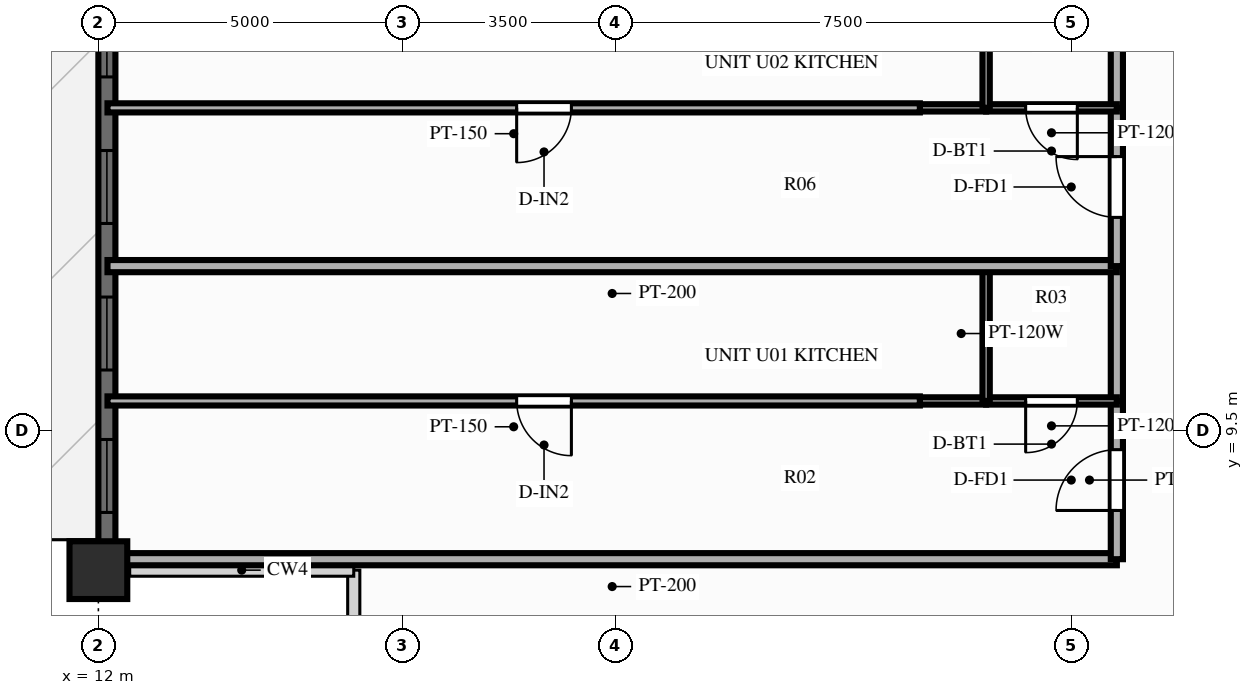
"""IFC4 building model, lengths in metres.
Left out: names, types, materials, properties, quantities, classifications, styles, units other than length and angle.
Written with IfcOpenShell. Run it as: python <this file> out.ifc"""

import sys

from ifc_helpers import new_model, si_unit, direction, frame, frame_2d, origin, origin_2d, place, context, subcontext, project, spatial, rectangle, extrude, source, transform, mapped, element, fill, save


model = new_model("IFC4")
c1 = context("Model", 3, precision=1e-05, world=origin(), true_north=direction((0.0, 1.0)))
c2 = subcontext(c1, "Body", "Model", "MODEL_VIEW")
j1 = project(units=[si_unit("LENGTHUNIT", "METRE"), si_unit("PLANEANGLEUNIT", "RADIAN")], contexts=[c1])
p1 = place(None, origin())
s1 = spatial("IfcSite", under=j1, at=p1, CompositionType="ELEMENT")
p2 = place(p1, origin())
s2 = spatial("IfcBuilding", under=s1, at=p2, CompositionType="ELEMENT")
p3 = place(p2, frame((0.0, 0.0, 126.75)))
s3 = spatial("IfcBuildingStorey", under=s2, at=p3, CompositionType="ELEMENT", Elevation=126.75)
m1 = source(origin(), c2, "Body", "SweptSolid", [
    extrude(rectangle(XDim=0.95, YDim=0.95, at=origin_2d()), origin(), (0.0, 0.0, 1.0), 3.0),
])
p4 = place(p3, frame((12.0, 7.2, 0.0), z_axis=(0.0, 0.0, 1.0), x_axis=(1.0, 0.0, 0.0)))
e1 = element("IfcColumn", 1, at=p4, inside=s3, PredefinedType="COLUMN", context=c2, shape_type="MappedRepresentation", body=[
    mapped(m1, transform((0.0, 0.0, 0.0), scale=1.0)),
])
p5 = place(p3, frame((12.14, 7.2, 0.0), z_axis=(0.0, 0.0, 1.0), x_axis=(0.0, 1.0, 0.0)))
e2 = element("IfcWall", 2, at=p5, inside=s3, PredefinedType="SOLIDWALL", context=c2, shape_type="SweptSolid", body=[
    extrude(rectangle(XDim=39.6, YDim=0.28, at=frame_2d((19.8, 0.0))), origin(), (0.0, 0.0, 1.0), 2.28),
])
p6 = place(p5, frame((0.949, 0.0, 0.25)))
e3 = element("IfcOpeningElement", 3, at=p6, cuts=e2, PredefinedType="OPENING", context=c2, shape_type="SweptSolid", body=[
    extrude(rectangle(XDim=1.2, YDim=1.5, at=frame_2d((0.6, 0.75))), frame((0.0, 0.152, 0.0), z_axis=(0.0, -1.0, 0.0), x_axis=(1.0, 0.0, 0.0)), (0.0, 0.0, 1.0), 0.304),
])
p7 = place(p5, frame((3.292, 0.0, 0.25)))
e4 = element("IfcOpeningElement", 4, at=p7, cuts=e2, PredefinedType="OPENING", context=c2, shape_type="SweptSolid", body=[
    extrude(rectangle(XDim=1.2, YDim=1.5, at=frame_2d((0.6, 0.75))), frame((0.0, 0.152, 0.0), z_axis=(0.0, -1.0, 0.0), x_axis=(1.0, 0.0, 0.0)), (0.0, 0.0, 1.0), 0.304),
])
p8 = place(p5, frame((5.702, 0.0, 0.25)))
e5 = element("IfcOpeningElement", 5, at=p8, cuts=e2, PredefinedType="OPENING", context=c2, shape_type="SweptSolid", body=[
    extrude(rectangle(XDim=1.2, YDim=1.5, at=frame_2d((0.6, 0.75))), frame((0.0, 0.152, 0.0), z_axis=(0.0, -1.0, 0.0), x_axis=(1.0, 0.0, 0.0)), (0.0, 0.0, 1.0), 0.304),
])
p9 = place(p5, frame((8.112, 0.0, 0.25)))
e6 = element("IfcOpeningElement", 6, at=p9, cuts=e2, PredefinedType="OPENING", context=c2, shape_type="SweptSolid", body=[
    extrude(rectangle(XDim=1.2, YDim=1.5, at=frame_2d((0.6, 0.75))), frame((0.0, 0.152, 0.0), z_axis=(0.0, -1.0, 0.0), x_axis=(1.0, 0.0, 0.0)), (0.0, 0.0, 1.0), 0.304),
])
p10 = place(p5, frame((12.521, 0.0, 0.25)))
e7 = element("IfcOpeningElement", 7, at=p10, cuts=e2, PredefinedType="OPENING", context=c2, shape_type="SweptSolid", body=[
    extrude(rectangle(XDim=1.2, YDim=1.5, at=frame_2d((0.6, 0.75))), frame((0.0, 0.152, 0.0), z_axis=(0.0, -1.0, 0.0), x_axis=(1.0, 0.0, 0.0)), (0.0, 0.0, 1.0), 0.304),
])
p11 = place(p5, frame((14.745, 0.0, 0.25)))
e8 = element("IfcOpeningElement", 8, at=p11, cuts=e2, PredefinedType="OPENING", context=c2, shape_type="SweptSolid", body=[
    extrude(rectangle(XDim=1.2, YDim=1.5, at=frame_2d((0.6, 0.75))), frame((0.0, 0.152, 0.0), z_axis=(0.0, -1.0, 0.0), x_axis=(1.0, 0.0, 0.0)), (0.0, 0.0, 1.0), 0.304),
])
p12 = place(p5, frame((16.97, 0.0, 0.25)))
e9 = element("IfcOpeningElement", 9, at=p12, cuts=e2, PredefinedType="OPENING", context=c2, shape_type="SweptSolid", body=[
    extrude(rectangle(XDim=1.2, YDim=1.5, at=frame_2d((0.6, 0.75))), frame((0.0, 0.152, 0.0), z_axis=(0.0, -1.0, 0.0), x_axis=(1.0, 0.0, 0.0)), (0.0, 0.0, 1.0), 0.304),
])
p13 = place(p5, frame((19.2, 0.0, 0.25)))
e10 = element("IfcOpeningElement", 10, at=p13, cuts=e2, PredefinedType="OPENING", context=c2, shape_type="SweptSolid", body=[
    extrude(rectangle(XDim=1.2, YDim=1.5, at=frame_2d((0.6, 0.75))), frame((0.0, 0.152, 0.0), z_axis=(0.0, -1.0, 0.0), x_axis=(1.0, 0.0, 0.0)), (0.0, 0.0, 1.0), 0.304),
])
p14 = place(p5, frame((21.578, 0.0, 0.25)))
e11 = element("IfcOpeningElement", 11, at=p14, cuts=e2, PredefinedType="OPENING", context=c2, shape_type="SweptSolid", body=[
    extrude(rectangle(XDim=1.2, YDim=1.5, at=frame_2d((0.6, 0.75))), frame((0.0, 0.152, 0.0), z_axis=(0.0, -1.0, 0.0), x_axis=(1.0, 0.0, 0.0)), (0.0, 0.0, 1.0), 0.304),
])
p15 = place(p5, frame((24.713, 0.0, 0.0)))
e12 = element("IfcOpeningElement", 12, at=p15, cuts=e2, PredefinedType="OPENING", context=c2, shape_type="SweptSolid", body=[
    extrude(rectangle(XDim=1.6, YDim=2.15, at=frame_2d((0.8, 1.075))), frame((0.0, 0.152, 0.0), z_axis=(0.0, -1.0, 0.0), x_axis=(1.0, 0.0, 0.0)), (0.0, 0.0, 1.0), 0.304),
])
p16 = place(p5, frame((29.305, 0.0, 0.25)))
e13 = element("IfcOpeningElement", 13, at=p16, cuts=e2, PredefinedType="OPENING", context=c2, shape_type="SweptSolid", body=[
    extrude(rectangle(XDim=0.7, YDim=1.5, at=frame_2d((0.35, 0.75))), frame((0.0, 0.152, 0.0), z_axis=(0.0, -1.0, 0.0), x_axis=(1.0, 0.0, 0.0)), (0.0, 0.0, 1.0), 0.304),
])
p17 = place(p5, frame((30.848, 0.0, 0.25)))
e14 = element("IfcOpeningElement", 14, at=p17, cuts=e2, PredefinedType="OPENING", context=c2, shape_type="SweptSolid", body=[
    extrude(rectangle(XDim=1.2, YDim=1.5, at=frame_2d((0.6, 0.75))), frame((0.0, 0.152, 0.0), z_axis=(0.0, -1.0, 0.0), x_axis=(1.0, 0.0, 0.0)), (0.0, 0.0, 1.0), 0.304),
])
p18 = place(p5, frame((34.183, 0.0, 0.25)))
e15 = element("IfcOpeningElement", 15, at=p18, cuts=e2, PredefinedType="OPENING", context=c2, shape_type="SweptSolid", body=[
    extrude(rectangle(XDim=1.2, YDim=1.5, at=frame_2d((0.6, 0.75))), frame((0.0, 0.152, 0.0), z_axis=(0.0, -1.0, 0.0), x_axis=(1.0, 0.0, 0.0)), (0.0, 0.0, 1.0), 0.304),
])
p19 = place(p5, frame((37.452, 0.0, 0.25)))
e16 = element("IfcOpeningElement", 16, at=p19, cuts=e2, PredefinedType="OPENING", context=c2, shape_type="SweptSolid", body=[
    extrude(rectangle(XDim=1.2, YDim=1.5, at=frame_2d((0.6, 0.75))), frame((0.0, 0.152, 0.0), z_axis=(0.0, -1.0, 0.0), x_axis=(1.0, 0.0, 0.0)), (0.0, 0.0, 1.0), 0.304),
])
p20 = place(p3, frame((28.75, 7.38, 0.0), z_axis=(0.0, 0.0, 1.0), x_axis=(-1.0, 0.0, 0.0)))
e17 = element("IfcWall", 17, at=p20, inside=s3, PredefinedType="PARTITIONING", context=c2, shape_type="SweptSolid", body=[
    extrude(rectangle(XDim=16.6, YDim=0.2, at=frame_2d((8.3, 0.0))), origin(), (0.0, 0.0, 1.0), 2.79),
])
p21 = place(p3, frame((28.75, 7.38, 0.0), z_axis=(0.0, 0.0, 1.0), x_axis=(0.0, 1.0, 0.0)))
e18 = element("IfcWall", 18, at=p21, inside=s3, PredefinedType="PARTITIONING", context=c2, shape_type="SweptSolid", body=[
    extrude(rectangle(XDim=2.603, YDim=0.2, at=frame_2d((1.302, 0.0))), origin(), (0.0, 0.0, 1.0), 2.79),
])
p22 = place(p21, frame((0.802, 0.0, 0.0)))
e19 = element("IfcOpeningElement", 19, at=p22, cuts=e18, PredefinedType="OPENING", context=c2, shape_type="SweptSolid", body=[
    extrude(rectangle(XDim=1.0, YDim=2.15, at=frame_2d((0.5, 1.075))), frame((0.0, 0.112, 0.0), z_axis=(0.0, -1.0, 0.0), x_axis=(1.0, 0.0, 0.0)), (0.0, 0.0, 1.0), 0.224),
])
p23 = place(p3, frame((28.75, 9.983, 0.0), z_axis=(0.0, 0.0, 1.0), x_axis=(0.0, 1.0, 0.0)))
e20 = element("IfcWall", 20, at=p23, inside=s3, PredefinedType="PARTITIONING", context=c2, shape_type="SweptSolid", body=[
    extrude(rectangle(XDim=2.218, YDim=0.2, at=frame_2d((1.109, 0.0))), origin(), (0.0, 0.0, 1.0), 2.79),
])
p24 = place(p3, frame((28.75, 9.983, 0.0), z_axis=(0.0, 0.0, 1.0), x_axis=(-1.0, 0.0, 0.0)))
e21 = element("IfcWall", 21, at=p24, inside=s3, PredefinedType="PARTITIONING", context=c2, shape_type="SweptSolid", body=[
    extrude(rectangle(XDim=2.15, YDim=0.12, at=frame_2d((1.075, 0.0))), origin(), (0.0, 0.0, 1.0), 2.79),
])
p25 = place(p24, frame((0.65, 0.0, 0.0)))
e22 = element("IfcOpeningElement", 22, at=p25, cuts=e21, PredefinedType="OPENING", context=c2, shape_type="SweptSolid", body=[
    extrude(rectangle(XDim=0.85, YDim=2.05, at=frame_2d((0.425, 1.025))), frame((0.0, 0.072, 0.0), z_axis=(0.0, -1.0, 0.0), x_axis=(1.0, 0.0, 0.0)), (0.0, 0.0, 1.0), 0.144),
])
p26 = place(p3, frame((26.6, 9.983, 0.0), z_axis=(0.0, 0.0, 1.0), x_axis=(-1.0, 0.0, 0.0)))
e23 = element("IfcWall", 23, at=p26, inside=s3, PredefinedType="PARTITIONING", context=c2, shape_type="SweptSolid", body=[
    extrude(rectangle(XDim=1.09, YDim=0.12, at=frame_2d((0.545, 0.0))), origin(), (0.0, 0.0, 1.0), 2.79),
])
p27 = place(p3, frame((26.6, 9.983, 0.0), z_axis=(0.0, 0.0, 1.0), x_axis=(0.0, 1.0, 0.0)))
e24 = element("IfcWall", 24, at=p27, inside=s3, PredefinedType="PARTITIONING", context=c2, shape_type="SweptSolid", body=[
    extrude(rectangle(XDim=2.218, YDim=0.12, at=frame_2d((1.109, 0.0))), origin(), (0.0, 0.0, 1.0), 2.79),
])
p28 = place(p3, frame((25.51, 9.983, 0.0), z_axis=(0.0, 0.0, 1.0), x_axis=(-1.0, 0.0, 0.0)))
e25 = element("IfcWall", 25, at=p28, inside=s3, PredefinedType="PARTITIONING", context=c2, shape_type="SweptSolid", body=[
    extrude(rectangle(XDim=13.36, YDim=0.15, at=frame_2d((6.68, 0.0))), origin(), (0.0, 0.0, 1.0), 2.79),
])
p29 = place(p28, frame((5.731, 0.0, 0.0)))
e26 = element("IfcOpeningElement", 26, at=p29, cuts=e25, PredefinedType="OPENING", context=c2, shape_type="SweptSolid", body=[
    extrude(rectangle(XDim=0.9, YDim=2.1, at=frame_2d((0.45, 1.05))), frame((0.0, 0.087, 0.0), z_axis=(0.0, -1.0, 0.0), x_axis=(1.0, 0.0, 0.0)), (0.0, 0.0, 1.0), 0.174),
])
p30 = place(p3, frame((28.75, 12.2, 0.0), z_axis=(0.0, 0.0, 1.0), x_axis=(-1.0, 0.0, 0.0)))
e27 = element("IfcWall", 27, at=p30, inside=s3, PredefinedType="PARTITIONING", context=c2, shape_type="SweptSolid", body=[
    extrude(rectangle(XDim=16.6, YDim=0.2, at=frame_2d((8.3, 0.0))), origin(), (0.0, 0.0, 1.0), 2.79),
])
p31 = place(p3, frame((28.75, 12.2, 0.0), z_axis=(0.0, 0.0, 1.0), x_axis=(0.0, 1.0, 0.0)))
e28 = element("IfcWall", 28, at=p31, inside=s3, PredefinedType="PARTITIONING", context=c2, shape_type="SweptSolid", body=[
    extrude(rectangle(XDim=2.603, YDim=0.2, at=frame_2d((1.302, 0.0))), origin(), (0.0, 0.0, 1.0), 2.79),
])
p32 = place(p31, frame((0.802, 0.0, 0.0)))
e29 = element("IfcOpeningElement", 29, at=p32, cuts=e28, PredefinedType="OPENING", context=c2, shape_type="SweptSolid", body=[
    extrude(rectangle(XDim=1.0, YDim=2.15, at=frame_2d((0.5, 1.075))), frame((0.0, 0.112, 0.0), z_axis=(0.0, -1.0, 0.0), x_axis=(1.0, 0.0, 0.0)), (0.0, 0.0, 1.0), 0.224),
])
p33 = place(p3, frame((28.75, 14.803, 0.0), z_axis=(0.0, 0.0, 1.0), x_axis=(0.0, 1.0, 0.0)))
e30 = element("IfcWall", 30, at=p33, inside=s3, PredefinedType="PARTITIONING", context=c2, shape_type="SweptSolid", body=[
    extrude(rectangle(XDim=2.217, YDim=0.2, at=frame_2d((1.109, 0.0))), origin(), (0.0, 0.0, 1.0), 2.79),
])
p34 = place(p3, frame((28.75, 14.803, 0.0), z_axis=(0.0, 0.0, 1.0), x_axis=(-1.0, 0.0, 0.0)))
e31 = element("IfcWall", 31, at=p34, inside=s3, PredefinedType="PARTITIONING", context=c2, shape_type="SweptSolid", body=[
    extrude(rectangle(XDim=2.15, YDim=0.12, at=frame_2d((1.075, 0.0))), origin(), (0.0, 0.0, 1.0), 2.79),
])
p35 = place(p34, frame((0.65, 0.0, 0.0)))
e32 = element("IfcOpeningElement", 32, at=p35, cuts=e31, PredefinedType="OPENING", context=c2, shape_type="SweptSolid", body=[
    extrude(rectangle(XDim=0.85, YDim=2.05, at=frame_2d((0.425, 1.025))), frame((0.0, 0.072, 0.0), z_axis=(0.0, -1.0, 0.0), x_axis=(1.0, 0.0, 0.0)), (0.0, 0.0, 1.0), 0.144),
])
p36 = place(p3, frame((26.6, 14.803, 0.0), z_axis=(0.0, 0.0, 1.0), x_axis=(-1.0, 0.0, 0.0)))
e33 = element("IfcWall", 33, at=p36, inside=s3, PredefinedType="PARTITIONING", context=c2, shape_type="SweptSolid", body=[
    extrude(rectangle(XDim=1.09, YDim=0.12, at=frame_2d((0.545, 0.0))), origin(), (0.0, 0.0, 1.0), 2.79),
])
p37 = place(p3, frame((26.6, 14.803, 0.0), z_axis=(0.0, 0.0, 1.0), x_axis=(0.0, 1.0, 0.0)))
e34 = element("IfcWall", 34, at=p37, inside=s3, PredefinedType="PARTITIONING", context=c2, shape_type="SweptSolid", body=[
    extrude(rectangle(XDim=2.217, YDim=0.12, at=frame_2d((1.109, 0.0))), origin(), (0.0, 0.0, 1.0), 2.79),
])
p38 = place(p3, frame((25.51, 14.803, 0.0), z_axis=(0.0, 0.0, 1.0), x_axis=(-1.0, 0.0, 0.0)))
e35 = element("IfcWall", 35, at=p38, inside=s3, PredefinedType="PARTITIONING", context=c2, shape_type="SweptSolid", body=[
    extrude(rectangle(XDim=13.36, YDim=0.15, at=frame_2d((6.68, 0.0))), origin(), (0.0, 0.0, 1.0), 2.79),
])
p39 = place(p38, frame((5.731, 0.0, 0.0)))
e36 = element("IfcOpeningElement", 36, at=p39, cuts=e35, PredefinedType="OPENING", context=c2, shape_type="SweptSolid", body=[
    extrude(rectangle(XDim=0.9, YDim=2.1, at=frame_2d((0.45, 1.05))), frame((0.0, 0.087, 0.0), z_axis=(0.0, -1.0, 0.0), x_axis=(1.0, 0.0, 0.0)), (0.0, 0.0, 1.0), 0.174),
])
m2 = source(origin(), c2, "Body", "SweptSolid", [
    extrude(rectangle(XDim=1.2, YDim=1.5, at=frame_2d((0.6, 0.75))), frame((0.0, 0.03, 0.0), z_axis=(0.0, -1.0, 0.0), x_axis=(1.0, 0.0, 0.0)), (0.0, 0.0, 1.0), 0.06),
])
p40 = place(p6, origin())
e37 = element("IfcWindow", 37, at=p40, inside=s3, PartitioningType="SINGLE_PANEL", PredefinedType="WINDOW", context=c2, shape_type="MappedRepresentation", body=[
    mapped(m2, transform((0.0, 0.0, 0.0), scale=1.0)),
])
fill(e3, e37)
p41 = place(p7, origin())
e38 = element("IfcWindow", 38, at=p41, inside=s3, PartitioningType="SINGLE_PANEL", PredefinedType="WINDOW", context=c2, shape_type="MappedRepresentation", body=[
    mapped(m2, transform((0.0, 0.0, 0.0), scale=1.0)),
])
fill(e4, e38)
p42 = place(p8, origin())
e39 = element("IfcWindow", 39, at=p42, inside=s3, PartitioningType="SINGLE_PANEL", PredefinedType="WINDOW", context=c2, shape_type="MappedRepresentation", body=[
    mapped(m2, transform((0.0, 0.0, 0.0), scale=1.0)),
])
fill(e5, e39)
p43 = place(p9, origin())
e40 = element("IfcWindow", 40, at=p43, inside=s3, PartitioningType="SINGLE_PANEL", PredefinedType="WINDOW", context=c2, shape_type="MappedRepresentation", body=[
    mapped(m2, transform((0.0, 0.0, 0.0), scale=1.0)),
])
fill(e6, e40)
m3 = source(origin(), c2, "Body", "SweptSolid", [
    extrude(rectangle(XDim=1.0, YDim=2.15, at=frame_2d((0.5, 1.075))), frame((0.0, 0.025, 0.0), z_axis=(0.0, -1.0, 0.0), x_axis=(1.0, 0.0, 0.0)), (0.0, 0.0, 1.0), 0.05),
])
p44 = place(p22, origin())
e41 = element("IfcDoor", 41, at=p44, inside=s3, OperationType="SINGLE_SWING_LEFT", PredefinedType="DOOR", context=c2, shape_type="MappedRepresentation", body=[
    mapped(m3, transform((0.0, 0.0, 0.0), scale=1.0)),
])
fill(e19, e41)
m4 = source(origin(), c2, "Body", "SweptSolid", [
    extrude(rectangle(XDim=0.85, YDim=2.05, at=frame_2d((0.425, 1.025))), frame((0.0, 0.025, 0.0), z_axis=(0.0, -1.0, 0.0), x_axis=(1.0, 0.0, 0.0)), (0.0, 0.0, 1.0), 0.05),
])
p45 = place(p25, origin())
e42 = element("IfcDoor", 42, at=p45, inside=s3, OperationType="SINGLE_SWING_RIGHT", PredefinedType="DOOR", context=c2, shape_type="MappedRepresentation", body=[
    mapped(m4, transform((0.0, 0.0, 0.0), scale=1.0)),
])
fill(e22, e42)
m5 = source(origin(), c2, "Body", "SweptSolid", [
    extrude(rectangle(XDim=0.9, YDim=2.1, at=frame_2d((0.45, 1.05))), frame((0.0, 0.025, 0.0), z_axis=(0.0, -1.0, 0.0), x_axis=(1.0, 0.0, 0.0)), (0.0, 0.0, 1.0), 0.05),
])
p46 = place(p29, origin())
e43 = element("IfcDoor", 43, at=p46, inside=s3, OperationType="SINGLE_SWING_LEFT", PredefinedType="DOOR", context=c2, shape_type="MappedRepresentation", body=[
    mapped(m5, transform((0.0, 0.0, 0.0), scale=1.0)),
])
fill(e26, e43)
p47 = place(p32, origin())
e44 = element("IfcDoor", 44, at=p47, inside=s3, OperationType="SINGLE_SWING_RIGHT", PredefinedType="DOOR", context=c2, shape_type="MappedRepresentation", body=[
    mapped(m3, transform((0.0, 0.0, 0.0), scale=1.0)),
])
fill(e29, e44)
p48 = place(p35, origin())
e45 = element("IfcDoor", 45, at=p48, inside=s3, OperationType="SINGLE_SWING_LEFT", PredefinedType="DOOR", context=c2, shape_type="MappedRepresentation", body=[
    mapped(m4, transform((0.0, 0.0, 0.0), scale=1.0)),
])
fill(e32, e45)
p49 = place(p39, origin())
e46 = element("IfcDoor", 46, at=p49, inside=s3, OperationType="SINGLE_SWING_RIGHT", PredefinedType="DOOR", context=c2, shape_type="MappedRepresentation", body=[
    mapped(m5, transform((0.0, 0.0, 0.0), scale=1.0)),
])
fill(e36, e46)
save(model, sys.argv[1])
